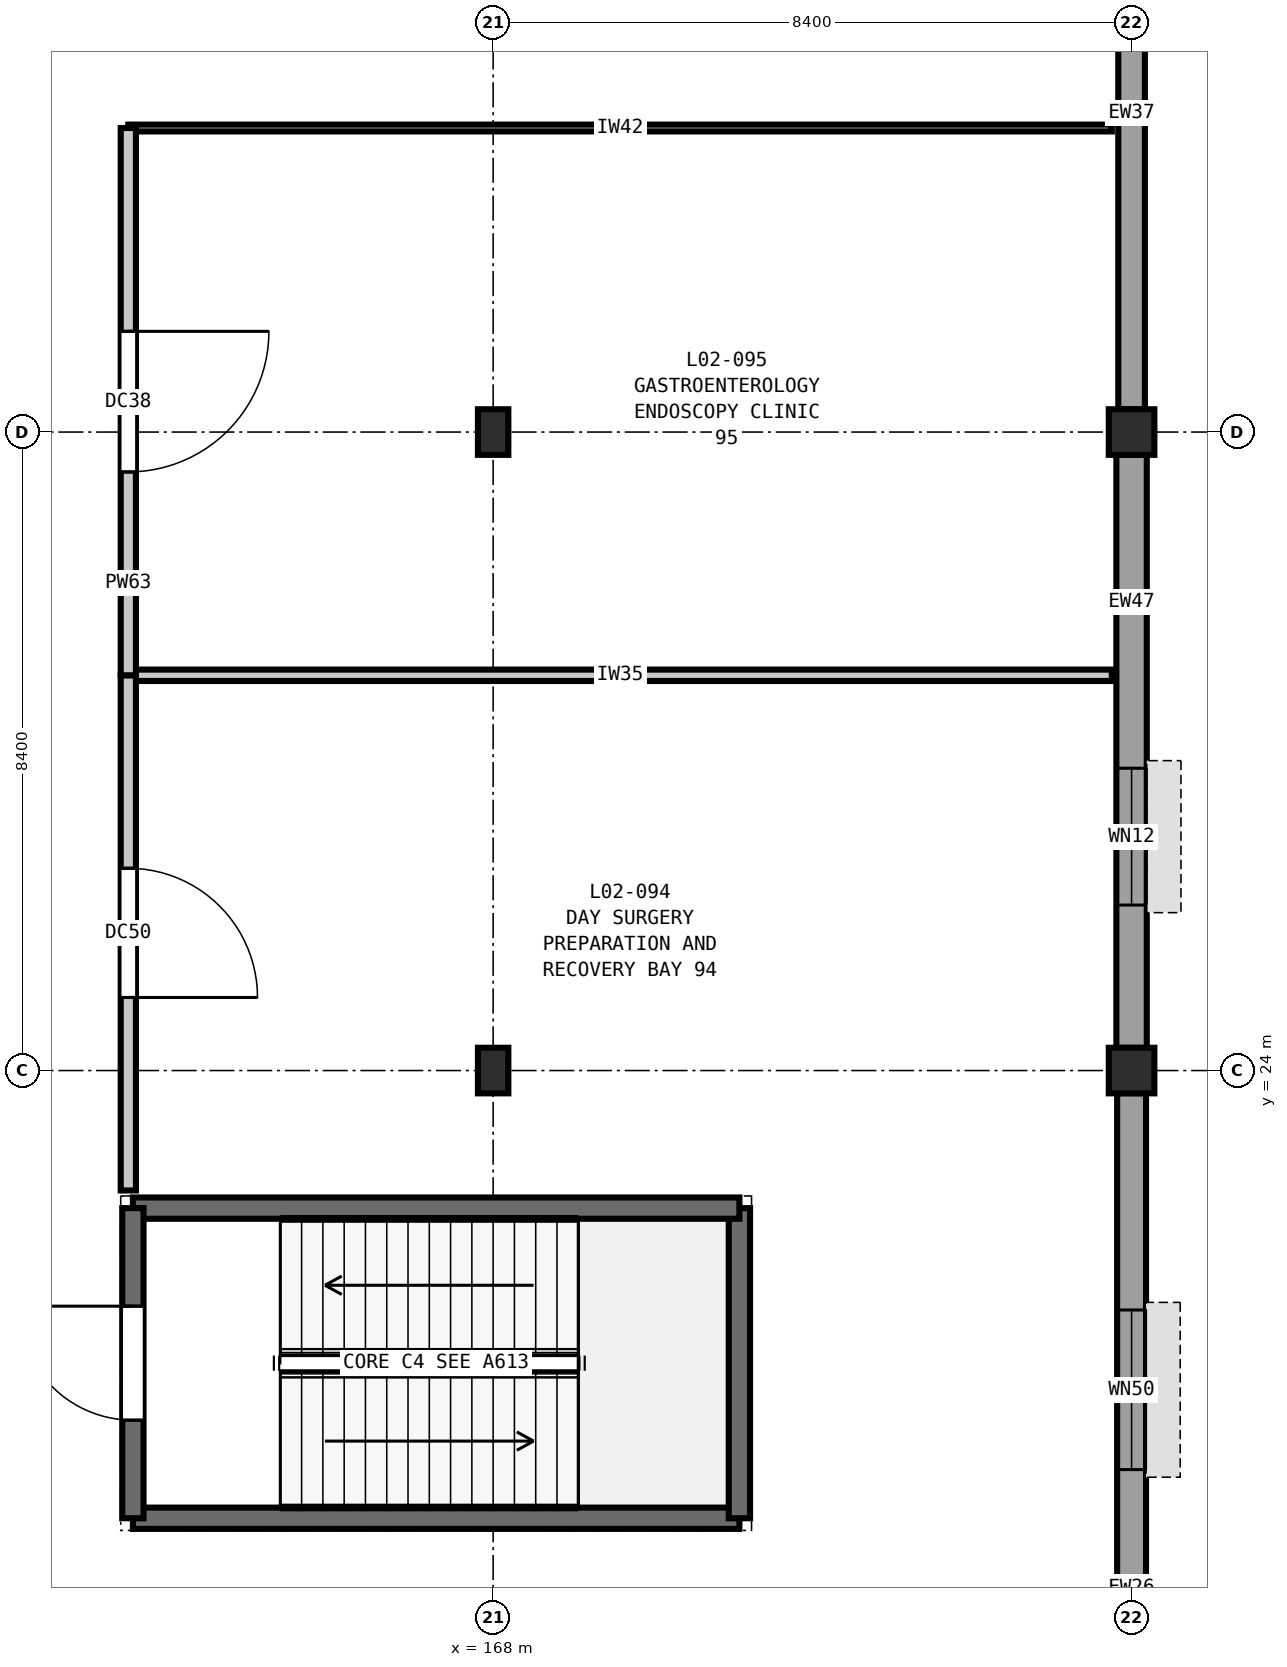
"""IFC4 building model, lengths in metres.
Left out: names, types, materials, properties, quantities, classifications, styles, units other than length and angle.
Written with IfcOpenShell. Run it as: python <this file> out.ifc"""

import sys

from ifc_helpers import new_model, si_unit, direction, frame, frame_2d, origin, origin_2d, place, context, subcontext, project, spatial, rectangle, extrude, element, fill, save


model = new_model("IFC4")
c1 = context("Model", 3, precision=1e-05, world=origin(), true_north=direction((0.0, 1.0)))
c2 = subcontext(c1, "Body", "Model", "MODEL_VIEW")
j1 = project(units=[si_unit("LENGTHUNIT", "METRE"), si_unit("PLANEANGLEUNIT", "RADIAN")], contexts=[c1])
p1 = place(None, origin())
s1 = spatial("IfcSite", under=j1, at=p1, CompositionType="ELEMENT")
p2 = place(p1, origin())
s2 = spatial("IfcBuilding", under=s1, at=p2, CompositionType="ELEMENT")
p3 = place(p2, frame((0.0, 0.0, 10.8)))
s3 = spatial("IfcBuildingStorey", under=s2, at=p3, CompositionType="ELEMENT", Elevation=10.8)
for number, where, z_axis, x_axis in (
    (1, (168.0, 24.0, 0.0), (0.0, 0.0, 1.0), (1.0, 0.0, 0.0)),
    (2, (168.0, 32.4, 0.0), (0.0, 0.0, 1.0), (1.0, 0.0, 0.0)),
):
    element("IfcColumn", number, at=place(p3, frame(where, z_axis=z_axis, x_axis=x_axis)), inside=s3, PredefinedType="COLUMN", context=c2, shape_type="SweptSolid", body=[
        extrude(rectangle(XDim=0.4, YDim=0.6, at=origin_2d()), origin(), (0.0, 0.0, 1.0), 5.4),
    ])
for number, where, z_axis, x_axis in (
    (3, (176.4, 24.0, 0.0), (0.0, 0.0, 1.0), (1.0, 0.0, 0.0)),
    (4, (176.4, 32.4, 0.0), (0.0, 0.0, 1.0), (1.0, 0.0, 0.0)),
):
    element("IfcColumn", number, at=place(p3, frame(where, z_axis=z_axis, x_axis=x_axis)), inside=s3, PredefinedType="COLUMN", context=c2, shape_type="SweptSolid", body=[
        extrude(rectangle(XDim=0.6, YDim=0.6, at=origin_2d()), origin(), (0.0, 0.0, 1.0), 5.4),
    ])
p4 = place(p3, frame((176.4, 40.502, 0.0), z_axis=(0.0, 0.0, 1.0), x_axis=(0.0, -1.0, 0.0)))
e5 = element("IfcWall", 5, at=p4, inside=s3, PredefinedType="SOLIDWALL", context=c2, shape_type="SweptSolid", body=[
    extrude(rectangle(XDim=7.804, YDim=0.35, at=frame_2d((3.902, 0.0))), origin(), (0.0, 0.0, 1.0), 4.68),
])
p5 = place(p3, frame((176.4, 32.102, 0.0), z_axis=(0.0, 0.0, 1.0), x_axis=(0.0, -1.0, 0.0)))
e6 = element("IfcWall", 6, at=p5, inside=s3, PredefinedType="SOLIDWALL", context=c2, shape_type="SweptSolid", body=[
    extrude(rectangle(XDim=7.804, YDim=0.4, at=frame_2d((3.902, 0.0))), origin(), (0.0, 0.0, 1.0), 4.68),
])
p6 = place(p5, frame((4.125, 0.0, 0.9)))
e7 = element("IfcOpeningElement", 7, at=p6, cuts=e6, PredefinedType="OPENING", context=c2, shape_type="SweptSolid", body=[
    extrude(rectangle(XDim=1.8, YDim=2.35, at=frame_2d((0.9, 1.175))), frame((0.0, 0.21, 0.0), z_axis=(0.0, -1.0, 0.0), x_axis=(1.0, 0.0, 0.0)), (0.0, 0.0, 1.0), 0.42),
])
p7 = place(p3, frame((176.4, 23.702, 0.0), z_axis=(0.0, 0.0, 1.0), x_axis=(0.0, -1.0, 0.0)))
e8 = element("IfcWall", 8, at=p7, inside=s3, PredefinedType="SOLIDWALL", context=c2, shape_type="SweptSolid", body=[
    extrude(rectangle(XDim=7.804, YDim=0.38, at=frame_2d((3.902, 0.0))), origin(), (0.0, 0.0, 1.0), 4.68),
])
p8 = place(p7, frame((2.852, 0.0, 0.9)))
e9 = element("IfcOpeningElement", 9, at=p8, cuts=e8, PredefinedType="OPENING", context=c2, shape_type="SweptSolid", body=[
    extrude(rectangle(XDim=2.1, YDim=2.35, at=frame_2d((1.05, 1.175))), frame((0.0, 0.2, 0.0), z_axis=(0.0, -1.0, 0.0), x_axis=(1.0, 0.0, 0.0)), (0.0, 0.0, 1.0), 0.4),
])
p9 = place(p3, frame((163.26, 18.11, 0.0), z_axis=(0.0, 0.0, 1.0), x_axis=(1.0, 0.0, 0.0)))
e10 = element("IfcWall", 10, at=p9, inside=s3, PredefinedType="SHEAR", context=c2, shape_type="SweptSolid", body=[
    extrude(rectangle(XDim=7.98, YDim=0.28, at=frame_2d((3.99, 0.0))), origin(), (0.0, 0.0, 1.0), 5.4),
])
p10 = place(p3, frame((171.24, 18.11, 0.0), z_axis=(0.0, 0.0, 1.0), x_axis=(0.0, 1.0, 0.0)))
e11 = element("IfcWall", 11, at=p10, inside=s3, PredefinedType="SHEAR", context=c2, shape_type="SweptSolid", body=[
    extrude(rectangle(XDim=4.08, YDim=0.28, at=frame_2d((2.04, 0.0))), origin(), (0.0, 0.0, 1.0), 5.4),
])
p11 = place(p3, frame((171.24, 22.19, 0.0), z_axis=(0.0, 0.0, 1.0), x_axis=(-1.0, 0.0, 0.0)))
e12 = element("IfcWall", 12, at=p11, inside=s3, PredefinedType="SHEAR", context=c2, shape_type="SweptSolid", body=[
    extrude(rectangle(XDim=7.98, YDim=0.28, at=frame_2d((3.99, 0.0))), origin(), (0.0, 0.0, 1.0), 5.4),
])
p12 = place(p3, frame((163.26, 22.19, 0.0), z_axis=(0.0, 0.0, 1.0), x_axis=(0.0, -1.0, 0.0)))
e13 = element("IfcWall", 13, at=p12, inside=s3, PredefinedType="SHEAR", context=c2, shape_type="SweptSolid", body=[
    extrude(rectangle(XDim=4.08, YDim=0.28, at=frame_2d((2.04, 0.0))), origin(), (0.0, 0.0, 1.0), 5.4),
])
p13 = place(p12, frame((1.29, 0.0, 0.0)))
e14 = element("IfcOpeningElement", 14, at=p13, cuts=e13, PredefinedType="OPENING", context=c2, shape_type="SweptSolid", body=[
    extrude(rectangle(XDim=1.5, YDim=2.2, at=frame_2d((0.75, 1.1))), frame((0.0, 0.15, 0.0), z_axis=(0.0, -1.0, 0.0), x_axis=(1.0, 0.0, 0.0)), (0.0, 0.0, 1.0), 0.3),
])
p14 = place(p3, frame((163.2, 29.2, 0.0), z_axis=(0.0, 0.0, 1.0), x_axis=(1.0, 0.0, 0.0)))
e15 = element("IfcWall", 15, at=p14, inside=s3, PredefinedType="PARTITIONING", context=c2, shape_type="SweptSolid", body=[
    extrude(rectangle(XDim=12.94, YDim=0.15, at=frame_2d((6.47, 0.0))), origin(), (0.0, 0.0, 1.0), 5.07),
])
p15 = place(p3, frame((163.2, 36.4, 0.0), z_axis=(0.0, 0.0, 1.0), x_axis=(1.0, 0.0, 0.0)))
e16 = element("IfcWall", 16, at=p15, inside=s3, PredefinedType="PARTITIONING", context=c2, shape_type="SweptSolid", body=[
    extrude(rectangle(XDim=12.94, YDim=0.09, at=frame_2d((6.47, 0.0))), origin(), (0.0, 0.0, 1.0), 5.07),
])
p16 = place(p3, frame((163.2, 22.422, 0.0), z_axis=(0.0, 0.0, 1.0), x_axis=(0.0, 1.0, 0.0)))
e17 = element("IfcWall", 17, at=p16, inside=s3, PredefinedType="PARTITIONING", context=c2, shape_type="SweptSolid", body=[
    extrude(rectangle(XDim=6.778, YDim=0.2, at=frame_2d((3.389, 0.0))), origin(), (0.0, 0.0, 1.0), 5.07),
])
p17 = place(p16, frame((2.539, 0.0, 0.0)))
e18 = element("IfcOpeningElement", 18, at=p17, cuts=e17, PredefinedType="OPENING", context=c2, shape_type="SweptSolid", body=[
    extrude(rectangle(XDim=1.7, YDim=2.3, at=frame_2d((0.85, 1.15))), frame((0.0, 0.11, 0.0), z_axis=(0.0, -1.0, 0.0), x_axis=(1.0, 0.0, 0.0)), (0.0, 0.0, 1.0), 0.22),
])
p18 = place(p3, frame((163.2, 29.2, 0.0), z_axis=(0.0, 0.0, 1.0), x_axis=(0.0, 1.0, 0.0)))
e19 = element("IfcWall", 19, at=p18, inside=s3, PredefinedType="PARTITIONING", context=c2, shape_type="SweptSolid", body=[
    extrude(rectangle(XDim=7.2, YDim=0.2, at=frame_2d((3.6, 0.0))), origin(), (0.0, 0.0, 1.0), 5.07),
])
p19 = place(p18, frame((2.675, 0.0, 0.0)))
e20 = element("IfcOpeningElement", 20, at=p19, cuts=e19, PredefinedType="OPENING", context=c2, shape_type="SweptSolid", body=[
    extrude(rectangle(XDim=1.85, YDim=2.3, at=frame_2d((0.925, 1.15))), frame((0.0, 0.11, 0.0), z_axis=(0.0, -1.0, 0.0), x_axis=(1.0, 0.0, 0.0)), (0.0, 0.0, 1.0), 0.22),
])
p20 = place(p6, origin())
e21 = element("IfcWindow", 21, at=p20, inside=s3, PartitioningType="DOUBLE_PANEL_VERTICAL", PredefinedType="WINDOW", context=c2, shape_type="SweptSolid", body=[
    extrude(rectangle(XDim=1.8, YDim=2.35, at=frame_2d((0.9, 1.175))), frame((0.0, 0.03, 0.0), z_axis=(0.0, -1.0, 0.0), x_axis=(1.0, 0.0, 0.0)), (0.0, 0.0, 1.0), 0.06),
])
fill(e7, e21)
p21 = place(p8, origin())
e22 = element("IfcWindow", 22, at=p21, inside=s3, PartitioningType="DOUBLE_PANEL_VERTICAL", PredefinedType="WINDOW", context=c2, shape_type="SweptSolid", body=[
    extrude(rectangle(XDim=2.1, YDim=2.35, at=frame_2d((1.05, 1.175))), frame((0.0, 0.03, 0.0), z_axis=(0.0, -1.0, 0.0), x_axis=(1.0, 0.0, 0.0)), (0.0, 0.0, 1.0), 0.06),
])
fill(e9, e22)
p22 = place(p13, frame((1.5, 0.0, 0.0), z_axis=(0.0, 0.0, 1.0), x_axis=(-1.0, 0.0, 0.0)))
e23 = element("IfcDoor", 23, at=p22, inside=s3, OperationType="SINGLE_SWING_RIGHT", PredefinedType="DOOR", context=c2, shape_type="SweptSolid", body=[
    extrude(rectangle(XDim=1.5, YDim=2.2, at=frame_2d((0.75, 1.1))), frame((0.0, 0.025, 0.0), z_axis=(0.0, -1.0, 0.0), x_axis=(1.0, 0.0, 0.0)), (0.0, 0.0, 1.0), 0.05),
])
fill(e14, e23)
p23 = place(p17, frame((1.7, 0.0, 0.0), z_axis=(0.0, 0.0, 1.0), x_axis=(-1.0, 0.0, 0.0)))
e24 = element("IfcDoor", 24, at=p23, inside=s3, OperationType="SINGLE_SWING_RIGHT", PredefinedType="DOOR", context=c2, shape_type="SweptSolid", body=[
    extrude(rectangle(XDim=1.7, YDim=2.3, at=frame_2d((0.85, 1.15))), frame((0.0, 0.025, 0.0), z_axis=(0.0, -1.0, 0.0), x_axis=(1.0, 0.0, 0.0)), (0.0, 0.0, 1.0), 0.05),
])
fill(e18, e24)
p24 = place(p19, frame((1.85, 0.0, 0.0), z_axis=(0.0, 0.0, 1.0), x_axis=(-1.0, 0.0, 0.0)))
e25 = element("IfcDoor", 25, at=p24, inside=s3, OperationType="SINGLE_SWING_LEFT", PredefinedType="DOOR", context=c2, shape_type="SweptSolid", body=[
    extrude(rectangle(XDim=1.85, YDim=2.3, at=frame_2d((0.925, 1.15))), frame((0.0, 0.025, 0.0), z_axis=(0.0, -1.0, 0.0), x_axis=(1.0, 0.0, 0.0)), (0.0, 0.0, 1.0), 0.05),
])
fill(e20, e25)
save(model, sys.argv[1])
